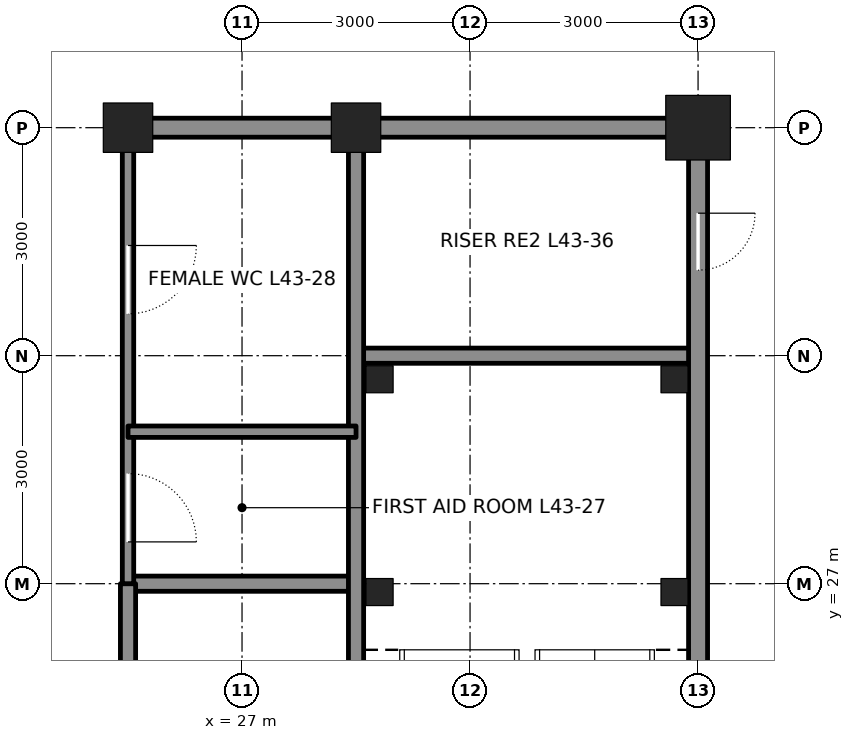
"""IFC4 building model, lengths in metres.
Left out: names, types, materials, properties, quantities, classifications, styles, units other than length and angle.
Written with IfcOpenShell. Run it as: python <this file> out.ifc"""

import sys

from ifc_helpers import new_model, si_unit, direction, frame, frame_2d, origin, origin_2d, place, context, subcontext, project, spatial, rectangle, hollow_rectangle, extrude, element, fill, save


model = new_model("IFC4")
c1 = context("Model", 3, precision=1e-05, world=origin(), true_north=direction((0.0, 1.0)))
c2 = subcontext(c1, "Body", "Model", "MODEL_VIEW")
j1 = project(units=[si_unit("LENGTHUNIT", "METRE"), si_unit("PLANEANGLEUNIT", "RADIAN")], contexts=[c1])
p1 = place(None, origin())
s1 = spatial("IfcSite", under=j1, at=p1, CompositionType="ELEMENT")
p2 = place(p1, origin())
s2 = spatial("IfcBuilding", under=s1, at=p2, CompositionType="ELEMENT")
p3 = place(p2, frame((0.0, 0.0, 197.1)))
s3 = spatial("IfcBuildingStorey", under=s2, at=p3, CompositionType="ELEMENT", Elevation=197.1)
for number, where, z_axis, x_axis in (
    (1, (25.5, 33.0, 0.0), (0.0, 0.0, 1.0), (1.0, 0.0, 0.0)),
    (2, (28.5, 33.0, 0.0), (0.0, 0.0, 1.0), (1.0, 0.0, 0.0)),
):
    element("IfcColumn", number, at=place(p3, frame(where, z_axis=z_axis, x_axis=x_axis)), inside=s3, PredefinedType="COLUMN", context=c2, shape_type="SweptSolid", body=[
        extrude(hollow_rectangle(XDim=0.65, YDim=0.65, WallThickness=0.065, at=origin_2d()), origin(), (0.0, 0.0, 1.0), 4.2),
    ])
p4 = place(p3, frame((33.0, 33.0, 0.0), z_axis=(0.0, 0.0, 1.0), x_axis=(1.0, 0.0, 0.0)))
e3 = element("IfcColumn", 3, at=p4, inside=s3, PredefinedType="COLUMN", context=c2, shape_type="SweptSolid", body=[
    extrude(hollow_rectangle(XDim=0.85, YDim=0.85, WallThickness=0.085, at=origin_2d()), origin(), (0.0, 0.0, 1.0), 4.2),
])
p5 = place(p3, frame((25.5, 27.0, 0.0), z_axis=(0.0, 0.0, 1.0), x_axis=(1.0, 0.0, 0.0)))
e4 = element("IfcWall", 4, at=p5, inside=s3, PredefinedType="SOLIDWALL", context=c2, shape_type="SweptSolid", body=[
    extrude(rectangle(XDim=3.0, YDim=0.2, at=frame_2d((1.5, 0.0))), origin(), (0.0, 0.0, 1.0), 4.04),
])
p6 = place(p3, frame((28.5, 30.0, 0.0), z_axis=(0.0, 0.0, 1.0), x_axis=(1.0, 0.0, 0.0)))
e5 = element("IfcWall", 5, at=p6, inside=s3, PredefinedType="SOLIDWALL", context=c2, shape_type="SweptSolid", body=[
    extrude(rectangle(XDim=4.5, YDim=0.2, at=frame_2d((2.25, 0.0))), origin(), (0.0, 0.0, 1.0), 4.04),
])
p7 = place(p3, frame((25.75, 33.0, 0.0), z_axis=(0.0, 0.0, 1.0), x_axis=(1.0, 0.0, 0.0)))
e6 = element("IfcWall", 6, at=p7, inside=s3, PredefinedType="SOLIDWALL", context=c2, shape_type="SweptSolid", body=[
    extrude(rectangle(XDim=2.5, YDim=0.25, at=frame_2d((1.25, 0.0))), origin(), (0.0, 0.0, 1.0), 3.181),
])
p8 = place(p3, frame((28.75, 33.0, 0.0), z_axis=(0.0, 0.0, 1.0), x_axis=(1.0, 0.0, 0.0)))
e7 = element("IfcWall", 7, at=p8, inside=s3, PredefinedType="SOLIDWALL", context=c2, shape_type="SweptSolid", body=[
    extrude(rectangle(XDim=4.0, YDim=0.25, at=frame_2d((2.0, 0.0))), origin(), (0.0, 0.0, 1.0), 3.181),
])
p9 = place(p3, frame((25.5, 15.0, 0.0), z_axis=(0.0, 0.0, 1.0), x_axis=(0.0, 1.0, 0.0)))
e8 = element("IfcWall", 8, at=p9, inside=s3, PredefinedType="SOLIDWALL", context=c2, shape_type="SweptSolid", body=[
    extrude(rectangle(XDim=12.0, YDim=0.2, at=frame_2d((6.0, 0.0))), origin(), (0.0, 0.0, 1.0), 3.064),
])
p10 = place(p3, frame((25.5, 27.0, 0.0), z_axis=(0.0, 0.0, 1.0), x_axis=(0.0, 1.0, 0.0)))
e9 = element("IfcWall", 9, at=p10, inside=s3, PredefinedType="PARTITIONING", context=c2, shape_type="SweptSolid", body=[
    extrude(rectangle(XDim=5.75, YDim=0.15, at=frame_2d((2.875, 0.0))), origin(), (0.0, 0.0, 1.0), 3.064),
])
p11 = place(p10, frame((0.55, 0.0, 0.0)))
e10 = element("IfcOpeningElement", 10, at=p11, cuts=e9, PredefinedType="OPENING", context=c2, shape_type="SweptSolid", body=[
    extrude(rectangle(XDim=0.9, YDim=2.1, at=frame_2d((0.45, 1.05))), frame((0.0, 0.085, 0.0), z_axis=(0.0, -1.0, 0.0), x_axis=(1.0, 0.0, 0.0)), (0.0, 0.0, 1.0), 0.17),
])
p12 = place(p10, frame((3.55, 0.0, 0.0)))
e11 = element("IfcOpeningElement", 11, at=p12, cuts=e9, PredefinedType="OPENING", context=c2, shape_type="SweptSolid", body=[
    extrude(rectangle(XDim=0.9, YDim=2.1, at=frame_2d((0.45, 1.05))), frame((0.0, 0.085, 0.0), z_axis=(0.0, -1.0, 0.0), x_axis=(1.0, 0.0, 0.0)), (0.0, 0.0, 1.0), 0.17),
])
p13 = place(p3, frame((28.5, 24.25, 0.0), z_axis=(0.0, 0.0, 1.0), x_axis=(0.0, 1.0, 0.0)))
e12 = element("IfcWall", 12, at=p13, inside=s3, PredefinedType="SOLIDWALL", context=c2, shape_type="SweptSolid", body=[
    extrude(rectangle(XDim=8.5, YDim=0.2, at=frame_2d((4.25, 0.0))), origin(), (0.0, 0.0, 1.0), 3.113),
])
p14 = place(p3, frame((33.0, 24.25, 0.0), z_axis=(0.0, 0.0, 1.0), x_axis=(0.0, 1.0, 0.0)))
e13 = element("IfcWall", 13, at=p14, inside=s3, PredefinedType="SOLIDWALL", context=c2, shape_type="SweptSolid", body=[
    extrude(rectangle(XDim=8.5, YDim=0.25, at=frame_2d((4.25, 0.0))), origin(), (0.0, 0.0, 1.0), 3.113),
])
p15 = place(p14, frame((6.875, 0.0, 0.0)))
e14 = element("IfcOpeningElement", 14, at=p15, cuts=e13, PredefinedType="OPENING", context=c2, shape_type="SweptSolid", body=[
    extrude(rectangle(XDim=0.75, YDim=2.1, at=frame_2d((0.375, 1.05))), frame((0.0, 0.135, 0.0), z_axis=(0.0, -1.0, 0.0), x_axis=(1.0, 0.0, 0.0)), (0.0, 0.0, 1.0), 0.27),
])
p16 = place(p3, frame((25.5, 29.0, 0.0), z_axis=(0.0, 0.0, 1.0), x_axis=(1.0, 0.0, 0.0)))
e15 = element("IfcWall", 15, at=p16, inside=s3, PredefinedType="PARTITIONING", context=c2, shape_type="SweptSolid", body=[
    extrude(rectangle(XDim=3.0, YDim=0.15, at=frame_2d((1.5, 0.0))), origin(), (0.0, 0.0, 1.0), 4.04),
])
for number, where, z_axis, x_axis in (
    (16, (28.81, 29.69, 0.0), (0.0, 0.0, 1.0), (1.0, 0.0, 0.0)),
    (17, (32.69, 29.69, 0.0), (0.0, 0.0, 1.0), (1.0, 0.0, 0.0)),
    (18, (28.81, 26.89, 0.0), (0.0, 0.0, 1.0), (1.0, 0.0, 0.0)),
    (19, (32.69, 26.89, 0.0), (0.0, 0.0, 1.0), (1.0, 0.0, 0.0)),
):
    element("IfcColumn", number, at=place(p3, frame(where, z_axis=z_axis, x_axis=x_axis)), inside=s3, PredefinedType="COLUMN", context=c2, shape_type="SweptSolid", body=[
        extrude(hollow_rectangle(XDim=0.356, YDim=0.356, WallThickness=0.015, at=origin_2d()), origin(), (0.0, 0.0, 1.0), 4.2),
    ])
p17 = place(p15, frame((0.75, 0.0, 0.0), z_axis=(0.0, 0.0, 1.0), x_axis=(-1.0, 0.0, 0.0)))
e20 = element("IfcDoor", 20, at=p17, inside=s3, OperationType="SINGLE_SWING_LEFT", PredefinedType="DOOR", context=c2, shape_type="SweptSolid", body=[
    extrude(rectangle(XDim=0.75, YDim=2.1, at=frame_2d((0.375, 1.05))), frame((0.0, 0.025, 0.0), z_axis=(0.0, -1.0, 0.0), x_axis=(1.0, 0.0, 0.0)), (0.0, 0.0, 1.0), 0.05),
])
fill(e14, e20)
p18 = place(p11, frame((0.9, 0.0, 0.0), z_axis=(0.0, 0.0, 1.0), x_axis=(-1.0, 0.0, 0.0)))
e21 = element("IfcDoor", 21, at=p18, inside=s3, OperationType="SINGLE_SWING_RIGHT", PredefinedType="DOOR", context=c2, shape_type="SweptSolid", body=[
    extrude(rectangle(XDim=0.9, YDim=2.1, at=frame_2d((0.45, 1.05))), frame((0.0, 0.025, 0.0), z_axis=(0.0, -1.0, 0.0), x_axis=(1.0, 0.0, 0.0)), (0.0, 0.0, 1.0), 0.05),
])
fill(e10, e21)
p19 = place(p12, frame((0.9, 0.0, 0.0), z_axis=(0.0, 0.0, 1.0), x_axis=(-1.0, 0.0, 0.0)))
e22 = element("IfcDoor", 22, at=p19, inside=s3, OperationType="SINGLE_SWING_LEFT", PredefinedType="DOOR", context=c2, shape_type="SweptSolid", body=[
    extrude(rectangle(XDim=0.9, YDim=2.1, at=frame_2d((0.45, 1.05))), frame((0.0, 0.025, 0.0), z_axis=(0.0, -1.0, 0.0), x_axis=(1.0, 0.0, 0.0)), (0.0, 0.0, 1.0), 0.05),
])
fill(e11, e22)
save(model, sys.argv[1])
